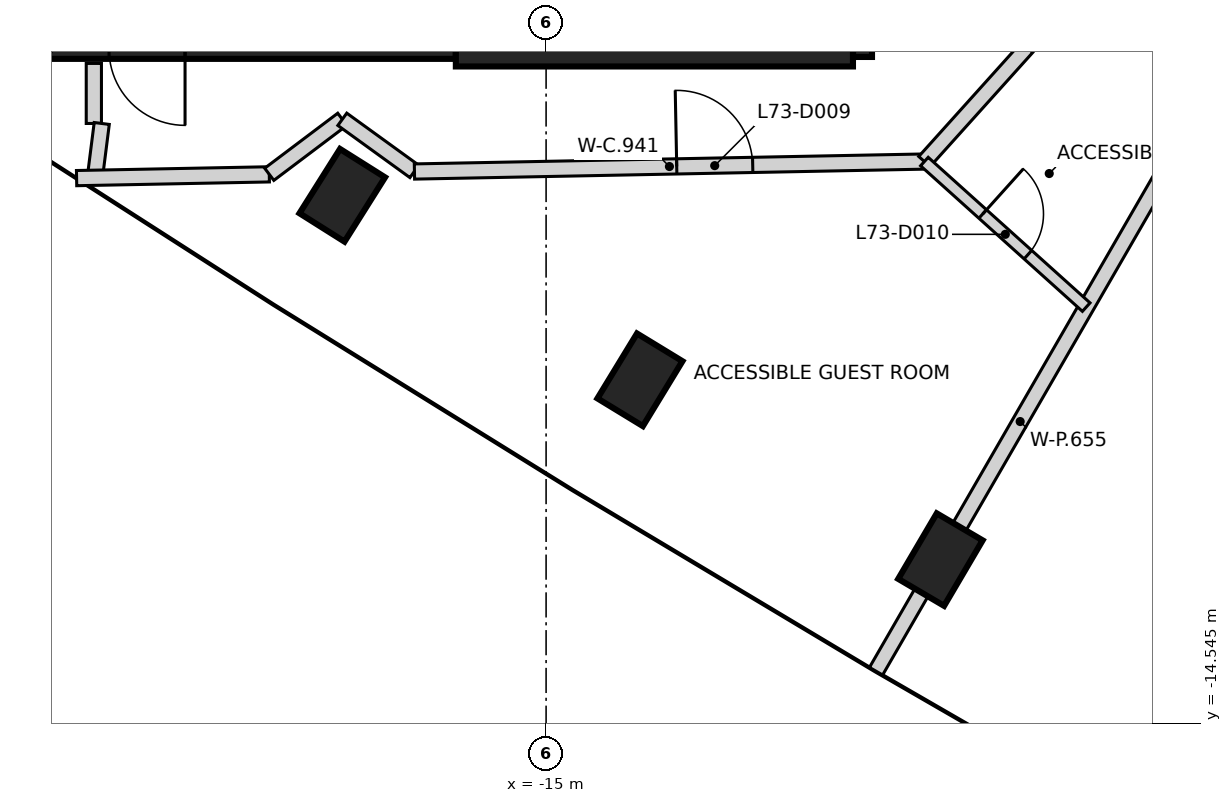
"""IFC4 building model, lengths in metres.
Left out: names, types, materials, properties, quantities, classifications, styles, units other than length and angle.
Written with IfcOpenShell. Run it as: python <this file> out.ifc"""

import sys

from ifc_helpers import new_model, si_unit, direction, frame, frame_2d, origin, origin_2d, place, context, subcontext, project, spatial, rectangle, extrude, element, fill, save


model = new_model("IFC4")
c1 = context("Model", 3, precision=1e-05, world=origin(), true_north=direction((0.0, 1.0)))
c2 = subcontext(c1, "Body", "Model", "MODEL_VIEW")
j1 = project(units=[si_unit("LENGTHUNIT", "METRE"), si_unit("PLANEANGLEUNIT", "RADIAN")], contexts=[c1])
p1 = place(None, origin())
s1 = spatial("IfcSite", under=j1, at=p1, CompositionType="ELEMENT")
p2 = place(p1, origin())
s2 = spatial("IfcBuilding", under=s1, at=p2, CompositionType="ELEMENT")
p3 = place(p2, frame((0.0, 0.0, 291.0)))
s3 = spatial("IfcBuildingStorey", under=s2, at=p3, CompositionType="ELEMENT", Elevation=291.0)
for number, where, z_axis, x_axis in (
    (1, (-17.681, -7.595, -0.35), (0.0, 0.0, 1.0), (0.533, 0.846, 0.0)),
    (2, (-13.765, -10.022, -0.35), (0.0, 0.0, 1.0), (0.52, 0.854, 0.0)),
    (3, (-9.812, -12.388, -0.35), (0.0, 0.0, 1.0), (0.507, 0.862, 0.0)),
):
    element("IfcColumn", number, at=place(p3, frame(where, z_axis=z_axis, x_axis=x_axis)), inside=s3, PredefinedType="COLUMN", context=c2, shape_type="SweptSolid", body=[
        extrude(rectangle(XDim=1.0, YDim=0.7, at=origin_2d()), origin(), (0.0, 0.0, 1.0), 3.6),
    ])
p4 = place(p3, frame((-10.837, 5.775, 0.0), z_axis=(0.0, 0.0, 1.0), x_axis=(0.0, -1.0, 0.0)))
e4 = element("IfcWall", 4, at=p4, inside=s3, PredefinedType="SHEAR", context=c2, shape_type="SweptSolid", body=[
    extrude(rectangle(XDim=11.55, YDim=0.25, at=frame_2d((5.775, 0.0))), origin(), (0.0, 0.0, 1.0), 3.25),
])
p5 = place(p4, frame((10.025, 0.0, 0.0)))
e5 = element("IfcOpeningElement", 5, at=p5, cuts=e4, PredefinedType="OPENING", context=c2, shape_type="SweptSolid", body=[
    extrude(rectangle(XDim=1.2, YDim=2.1, at=frame_2d((0.6, 1.05))), frame((0.0, 0.135, 0.0), z_axis=(0.0, -1.0, 0.0), x_axis=(1.0, 0.0, 0.0)), (0.0, 0.0, 1.0), 0.27),
])
p6 = place(p4, frame((8.725, 0.0, 0.0)))
e6 = element("IfcOpeningElement", 6, at=p6, cuts=e4, PredefinedType="OPENING", context=c2, shape_type="SweptSolid", body=[
    extrude(rectangle(XDim=1.2, YDim=2.1, at=frame_2d((0.6, 1.05))), frame((0.0, 0.135, 0.0), z_axis=(0.0, -1.0, 0.0), x_axis=(1.0, 0.0, 0.0)), (0.0, 0.0, 1.0), 0.27),
])
p7 = place(p3, frame((-16.187, -5.675, 0.0), z_axis=(0.0, 0.0, 1.0), x_axis=(-1.0, 0.0, 0.0)))
e7 = element("IfcWall", 7, at=p7, inside=s3, PredefinedType="SHEAR", context=c2, shape_type="SweptSolid", body=[
    extrude(rectangle(XDim=6.125, YDim=0.25, at=frame_2d((3.062, 0.0))), origin(), (0.0, 0.0, 1.0), 3.25),
])
p8 = place(p7, frame((3.563, 0.0, 0.0)))
e8 = element("IfcOpeningElement", 8, at=p8, cuts=e7, PredefinedType="OPENING", context=c2, shape_type="SweptSolid", body=[
    extrude(rectangle(XDim=1.0, YDim=2.1, at=frame_2d((0.5, 1.05))), frame((0.0, 0.135, 0.0), z_axis=(0.0, -1.0, 0.0), x_axis=(1.0, 0.0, 0.0)), (0.0, 0.0, 1.0), 0.27),
])
p9 = place(p3, frame((-10.963, -5.775, 0.0), z_axis=(0.0, 0.0, 1.0), x_axis=(-1.0, 0.0, 0.0)))
e9 = element("IfcWall", 9, at=p9, inside=s3, PredefinedType="SHEAR", context=c2, shape_type="SweptSolid", body=[
    extrude(rectangle(XDim=5.225, YDim=0.25, at=frame_2d((2.612, 0.0))), origin(), (0.0, 0.0, 1.0), 3.25),
])
p10 = place(p3, frame((-20.95, -6.65, 0.0), z_axis=(0.0, 0.0, 1.0), x_axis=(0.0, 1.0, 0.0)))
e10 = element("IfcWall", 10, at=p10, inside=s3, PredefinedType="PARTITIONING", context=c2, shape_type="SweptSolid", body=[
    extrude(rectangle(XDim=0.79, YDim=0.2, at=frame_2d((0.395, 0.0))), origin(), (0.0, 0.0, 1.0), 3.25),
])
p11 = place(p3, frame((-20.929, -7.305, 0.0), z_axis=(0.0, 0.0, 1.0), x_axis=(0.125718385971, 0.992065969293, 0.0)))
e11 = element("IfcWall", 11, at=p11, inside=s3, PredefinedType="PARTITIONING", context=c2, shape_type="SweptSolid", body=[
    extrude(rectangle(XDim=0.66, YDim=0.2, at=frame_2d((0.33, 0.0))), origin(), (0.0, 0.0, 1.0), 3.25),
])
p12 = place(p3, frame((-21.177, -7.369, 0.0), z_axis=(0.0, 0.0, 1.0), x_axis=(0.999808930271, 0.019547453804, 0.0)))
e12 = element("IfcWall", 12, at=p12, inside=s3, PredefinedType="PARTITIONING", context=c2, shape_type="SweptSolid", body=[
    extrude(rectangle(XDim=2.535, YDim=0.2, at=frame_2d((1.268, 0.0))), origin(), (0.0, 0.0, 1.0), 3.25),
])
p13 = place(p3, frame((-18.642, -7.319, 0.0), z_axis=(0.0, 0.0, 1.0), x_axis=(0.798707882989, 0.601718968998, 0.0)))
e13 = element("IfcWall", 13, at=p13, inside=s3, PredefinedType="PARTITIONING", context=c2, shape_type="SweptSolid", body=[
    extrude(rectangle(XDim=1.203, YDim=0.2, at=frame_2d((0.602, 0.0))), origin(), (0.0, 0.0, 1.0), 2.35),
])
p14 = place(p3, frame((-17.681, -6.595, 0.0), z_axis=(0.0, 0.0, 1.0), x_axis=(0.810123213102, -0.586259652026, 0.0)))
e14 = element("IfcWall", 14, at=p14, inside=s3, PredefinedType="PARTITIONING", context=c2, shape_type="SweptSolid", body=[
    extrude(rectangle(XDim=1.17, YDim=0.2, at=frame_2d((0.585, 0.0))), origin(), (0.0, 0.0, 1.0), 3.25),
])
p15 = place(p3, frame((-16.732, -7.282, 0.0), z_axis=(0.0, 0.0, 1.0), x_axis=(0.999809119854, 0.019537754635, 0.0)))
e15 = element("IfcWall", 15, at=p15, inside=s3, PredefinedType="PARTITIONING", context=c2, shape_type="SweptSolid", body=[
    extrude(rectangle(XDim=6.71, YDim=0.2, at=frame_2d((3.355, 0.0))), origin(), (0.0, 0.0, 1.0), 3.25),
])
p16 = place(p15, frame((3.451, 0.0, 0.0)))
e16 = element("IfcOpeningElement", 16, at=p16, cuts=e15, PredefinedType="OPENING", context=c2, shape_type="SweptSolid", body=[
    extrude(rectangle(XDim=1.0, YDim=2.1, at=frame_2d((0.5, 1.05))), frame((0.0, 0.11, 0.0), z_axis=(0.0, -1.0, 0.0), x_axis=(1.0, 0.0, 0.0)), (0.0, 0.0, 1.0), 0.22),
])
p17 = place(p3, frame((-10.023, -7.151, 0.0), z_axis=(0.0, 0.0, 1.0), x_axis=(0.668804583793, 0.743438248073, 0.0)))
e17 = element("IfcWall", 17, at=p17, inside=s3, PredefinedType="PARTITIONING", context=c2, shape_type="SweptSolid", body=[
    extrude(rectangle(XDim=2.021, YDim=0.2, at=frame_2d((1.011, 0.0))), origin(), (0.0, 0.0, 1.0), 3.25),
])
p18 = place(p3, frame((-10.659, -13.856, 0.0), z_axis=(0.0, 0.0, 1.0), x_axis=(0.49995742368, 0.866049983839, 0.0)))
e18 = element("IfcWall", 18, at=p18, inside=s3, PredefinedType="PARTITIONING", context=c2, shape_type="SweptSolid", body=[
    extrude(rectangle(XDim=7.585, YDim=0.2, at=frame_2d((3.792, 0.0))), origin(), (0.0, 0.0, 1.0), 3.25),
])
p19 = place(p3, frame((-10.023, -7.151, 0.0), z_axis=(0.0, 0.0, 1.0), x_axis=(0.743463699468, -0.668776291127, 0.0)))
e19 = element("IfcWall", 19, at=p19, inside=s3, PredefinedType="PARTITIONING", context=c2, shape_type="SweptSolid", body=[
    extrude(rectangle(XDim=2.864, YDim=0.15, at=frame_2d((1.432, 0.0))), origin(), (0.0, 0.0, 1.0), 3.25),
])
p20 = place(p19, frame((1.032, 0.0, 0.0)))
e20 = element("IfcOpeningElement", 20, at=p20, cuts=e19, PredefinedType="OPENING", context=c2, shape_type="SweptSolid", body=[
    extrude(rectangle(XDim=0.8, YDim=2.1, at=frame_2d((0.4, 1.05))), frame((0.0, 0.085, 0.0), z_axis=(0.0, -1.0, 0.0), x_axis=(1.0, 0.0, 0.0)), (0.0, 0.0, 1.0), 0.17),
])
p21 = place(p16, frame((1.0, 0.0, 0.0), z_axis=(0.0, 0.0, 1.0), x_axis=(-1.0, 0.0, 0.0)))
e21 = element("IfcDoor", 21, at=p21, inside=s3, OperationType="SINGLE_SWING_LEFT", PredefinedType="DOOR", context=c2, shape_type="SweptSolid", body=[
    extrude(rectangle(XDim=1.0, YDim=2.1, at=frame_2d((0.5, 1.05))), frame((0.0, 0.025, 0.0), z_axis=(0.0, -1.0, 0.0), x_axis=(1.0, 0.0, 0.0)), (0.0, 0.0, 1.0), 0.05),
])
fill(e16, e21)
p22 = place(p20, frame((0.8, 0.0, 0.0), z_axis=(0.0, 0.0, 1.0), x_axis=(-1.0, 0.0, 0.0)))
e22 = element("IfcDoor", 22, at=p22, inside=s3, OperationType="SINGLE_SWING_LEFT", PredefinedType="DOOR", context=c2, shape_type="SweptSolid", body=[
    extrude(rectangle(XDim=0.8, YDim=2.1, at=frame_2d((0.4, 1.05))), frame((0.0, 0.025, 0.0), z_axis=(0.0, -1.0, 0.0), x_axis=(1.0, 0.0, 0.0)), (0.0, 0.0, 1.0), 0.05),
])
fill(e20, e22)
save(model, sys.argv[1])
